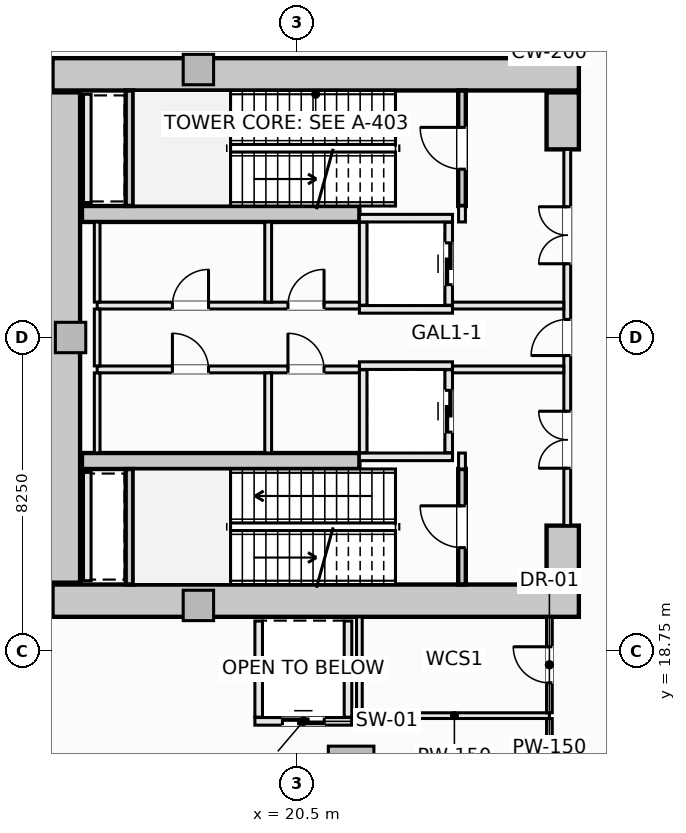
"""IFC4 building model, lengths in metres.
Left out: names, types, materials, properties, quantities, classifications, styles, units other than length and angle.
Written with IfcOpenShell. Run it as: python <this file> out.ifc"""

import sys

from ifc_helpers import new_model, si_unit, direction, frame, frame_2d, origin, origin_2d, place, context, subcontext, project, spatial, rectangle, extrude, element, fill, save


model = new_model("IFC4")
c1 = context("Model", 3, precision=1e-05, world=origin(), true_north=direction((0.0, 1.0)))
c2 = subcontext(c1, "Body", "Model", "MODEL_VIEW")
j1 = project(units=[si_unit("LENGTHUNIT", "METRE"), si_unit("PLANEANGLEUNIT", "RADIAN")], contexts=[c1])
p1 = place(None, origin())
s1 = spatial("IfcSite", under=j1, at=p1, CompositionType="ELEMENT")
p2 = place(p1, origin())
s2 = spatial("IfcBuilding", under=s1, at=p2, CompositionType="ELEMENT")
p3 = place(p2, frame((0.0, 0.0, 10.0)))
s3 = spatial("IfcBuildingStorey", under=s2, at=p3, CompositionType="ELEMENT", Elevation=10.0)
for number, where, z_axis, x_axis in (
    (1, (14.075, 33.925, -0.26), (0.0, 0.0, 1.0), (1.0, 0.0, 0.0)),
    (2, (14.075, 20.075, -0.26), (0.0, 0.0, 1.0), (1.0, 0.0, 0.0)),
):
    element("IfcWall", number, at=place(p3, frame(where, z_axis=z_axis, x_axis=x_axis)), inside=s3, PredefinedType="SHEAR", context=c2, shape_type="SweptSolid", body=[
        extrude(rectangle(XDim=13.85, YDim=0.85, at=frame_2d((6.925, 0.0))), origin(), (0.0, 0.0, 1.0), 5.02),
    ])
p4 = place(p3, frame((14.375, 20.55, -0.26), z_axis=(0.0, 0.0, 1.0), x_axis=(0.0, 1.0, 0.0)))
e3 = element("IfcWall", 3, at=p4, inside=s3, PredefinedType="SHEAR", context=c2, shape_type="SweptSolid", body=[
    extrude(rectangle(XDim=12.9, YDim=0.85, at=frame_2d((6.45, 0.0))), origin(), (0.0, 0.0, 1.0), 5.02),
])
for number, where, z_axis, x_axis in (
    (4, (27.5, 31.95, -0.26), (0.0, 0.0, 1.0), (0.0, 1.0, 0.0)),
    (5, (27.5, 20.55, -0.26), (0.0, 0.0, 1.0), (0.0, 1.0, 0.0)),
):
    element("IfcWall", number, at=place(p3, frame(where, z_axis=z_axis, x_axis=x_axis)), inside=s3, PredefinedType="SHEAR", context=c2, shape_type="SweptSolid", body=[
        extrude(rectangle(XDim=1.5, YDim=0.85, at=frame_2d((0.75, 0.0))), origin(), (0.0, 0.0, 1.0), 5.02),
    ])
for number, where, z_axis, x_axis in (
    (6, (14.85, 30.25, -0.26), (0.0, 0.0, 1.0), (1.0, 0.0, 0.0)),
    (7, (14.85, 23.75, -0.26), (0.0, 0.0, 1.0), (1.0, 0.0, 0.0)),
):
    element("IfcWall", number, at=place(p3, frame(where, z_axis=z_axis, x_axis=x_axis)), inside=s3, PredefinedType="SHEAR", context=c2, shape_type="SweptSolid", body=[
        extrude(rectangle(XDim=7.3, YDim=0.42, at=frame_2d((3.65, 0.0))), origin(), (0.0, 0.0, 1.0), 5.02),
    ])
p5 = place(p3, frame((21.932, 15.648, -0.26), z_axis=(0.0, 0.0, 1.0), x_axis=(1.0, 0.0, 0.0)))
e8 = element("IfcColumn", 8, at=p5, inside=s3, PredefinedType="COLUMN", context=c2, shape_type="SweptSolid", body=[
    extrude(rectangle(XDim=1.2, YDim=1.2, at=origin_2d()), origin(), (0.0, 0.0, 1.0), 5.02),
])
for number, where, z_axis, x_axis in (
    (9, (17.914, 34.05, -0.26), (0.0, 0.0, 1.0), (1.0, 0.0, 0.0)),
    (10, (14.55, 27.0, -0.26), (0.0, 0.0, 1.0), (1.0, 0.0, 0.0)),
    (11, (17.914, 19.95, -0.26), (0.0, 0.0, 1.0), (1.0, 0.0, 0.0)),
):
    element("IfcColumn", number, at=place(p3, frame(where, z_axis=z_axis, x_axis=x_axis)), inside=s3, PredefinedType="PILASTER", context=c2, shape_type="SweptSolid", body=[
        extrude(rectangle(XDim=0.8, YDim=0.8, at=origin_2d()), origin(), (0.0, 0.0, 1.0), 5.02),
    ])
p6 = place(p3, frame((24.85, 30.46, -0.26), z_axis=(0.0, 0.0, 1.0), x_axis=(0.0, 1.0, 0.0)))
e12 = element("IfcWall", 12, at=p6, inside=s3, PredefinedType="SHEAR", context=c2, shape_type="SweptSolid", body=[
    extrude(rectangle(XDim=3.038, YDim=0.2, at=frame_2d((1.519, 0.0))), origin(), (0.0, 0.0, 1.0), 5.02),
])
p7 = place(p6, frame((0.969, 0.0, 0.26)))
e13 = element("IfcOpeningElement", 13, at=p7, cuts=e12, PredefinedType="OPENING", context=c2, shape_type="SweptSolid", body=[
    extrude(rectangle(XDim=1.1, YDim=2.15, at=frame_2d((0.55, 1.075))), frame((0.0, 0.11, 0.0), z_axis=(0.0, -1.0, 0.0), x_axis=(1.0, 0.0, 0.0)), (0.0, 0.0, 1.0), 0.22),
])
p8 = place(p3, frame((16.1, 30.462, -0.26), z_axis=(0.0, 0.0, 1.0), x_axis=(0.0, 1.0, 0.0)))
e14 = element("IfcWall", 14, at=p8, inside=s3, PredefinedType="SHEAR", context=c2, shape_type="SweptSolid", body=[
    extrude(rectangle(XDim=3.036, YDim=0.2, at=frame_2d((1.518, 0.0))), origin(), (0.0, 0.0, 1.0), 5.02),
])
p9 = place(p3, frame((24.85, 20.502, -0.26), z_axis=(0.0, 0.0, 1.0), x_axis=(0.0, 1.0, 0.0)))
e15 = element("IfcWall", 15, at=p9, inside=s3, PredefinedType="SHEAR", context=c2, shape_type="SweptSolid", body=[
    extrude(rectangle(XDim=3.038, YDim=0.2, at=frame_2d((1.519, 0.0))), origin(), (0.0, 0.0, 1.0), 5.02),
])
p10 = place(p9, frame((0.969, 0.0, 0.26)))
e16 = element("IfcOpeningElement", 16, at=p10, cuts=e15, PredefinedType="OPENING", context=c2, shape_type="SweptSolid", body=[
    extrude(rectangle(XDim=1.1, YDim=2.15, at=frame_2d((0.55, 1.075))), frame((0.0, 0.11, 0.0), z_axis=(0.0, -1.0, 0.0), x_axis=(1.0, 0.0, 0.0)), (0.0, 0.0, 1.0), 0.22),
])
p11 = place(p3, frame((16.1, 20.502, -0.26), z_axis=(0.0, 0.0, 1.0), x_axis=(0.0, 1.0, 0.0)))
e17 = element("IfcWall", 17, at=p11, inside=s3, PredefinedType="SHEAR", context=c2, shape_type="SweptSolid", body=[
    extrude(rectangle(XDim=3.036, YDim=0.2, at=frame_2d((1.518, 0.0))), origin(), (0.0, 0.0, 1.0), 5.02),
])
for number, where, z_axis, x_axis in (
    (18, (22.15, 30.14, 0.0), (0.0, 0.0, 1.0), (1.0, 0.0, 0.0)),
    (19, (22.15, 27.74, 0.0), (0.0, 0.0, 1.0), (1.0, 0.0, 0.0)),
):
    element("IfcWall", number, at=place(p3, frame(where, z_axis=z_axis, x_axis=x_axis)), inside=s3, PredefinedType="SOLIDWALL", context=c2, shape_type="SweptSolid", body=[
        extrude(rectangle(XDim=2.45, YDim=0.2, at=frame_2d((1.225, 0.0))), origin(), (0.0, 0.0, 1.0), 4.76),
    ])
p12 = place(p3, frame((22.25, 27.85, 0.0), z_axis=(0.0, 0.0, 1.0), x_axis=(0.0, 1.0, 0.0)))
e20 = element("IfcWall", 20, at=p12, inside=s3, PredefinedType="SOLIDWALL", context=c2, shape_type="SweptSolid", body=[
    extrude(rectangle(XDim=2.18, YDim=0.2, at=frame_2d((1.09, 0.0))), origin(), (0.0, 0.0, 1.0), 4.76),
])
p13 = place(p3, frame((24.5, 27.85, 0.0), z_axis=(0.0, 0.0, 1.0), x_axis=(0.0, 1.0, 0.0)))
e21 = element("IfcWall", 21, at=p13, inside=s3, PredefinedType="SOLIDWALL", context=c2, shape_type="SweptSolid", body=[
    extrude(rectangle(XDim=2.18, YDim=0.2, at=frame_2d((1.09, 0.0))), origin(), (0.0, 0.0, 1.0), 4.76),
])
p14 = place(p13, frame((0.54, 0.0, 0.0)))
e22 = element("IfcOpeningElement", 22, at=p14, cuts=e21, PredefinedType="OPENING", context=c2, shape_type="SweptSolid", body=[
    extrude(rectangle(XDim=1.1, YDim=2.2, at=frame_2d((0.55, 1.1))), frame((0.0, 0.11, 0.0), z_axis=(0.0, -1.0, 0.0), x_axis=(1.0, 0.0, 0.0)), (0.0, 0.0, 1.0), 0.22),
])
for number, where, z_axis, x_axis in (
    (23, (22.15, 26.26, 0.0), (0.0, 0.0, 1.0), (1.0, 0.0, 0.0)),
    (24, (22.15, 23.86, 0.0), (0.0, 0.0, 1.0), (1.0, 0.0, 0.0)),
):
    element("IfcWall", number, at=place(p3, frame(where, z_axis=z_axis, x_axis=x_axis)), inside=s3, PredefinedType="SOLIDWALL", context=c2, shape_type="SweptSolid", body=[
        extrude(rectangle(XDim=2.45, YDim=0.2, at=frame_2d((1.225, 0.0))), origin(), (0.0, 0.0, 1.0), 4.76),
    ])
p15 = place(p3, frame((22.25, 23.97, 0.0), z_axis=(0.0, 0.0, 1.0), x_axis=(0.0, 1.0, 0.0)))
e25 = element("IfcWall", 25, at=p15, inside=s3, PredefinedType="SOLIDWALL", context=c2, shape_type="SweptSolid", body=[
    extrude(rectangle(XDim=2.18, YDim=0.2, at=frame_2d((1.09, 0.0))), origin(), (0.0, 0.0, 1.0), 4.76),
])
p16 = place(p3, frame((24.5, 23.97, 0.0), z_axis=(0.0, 0.0, 1.0), x_axis=(0.0, 1.0, 0.0)))
e26 = element("IfcWall", 26, at=p16, inside=s3, PredefinedType="SOLIDWALL", context=c2, shape_type="SweptSolid", body=[
    extrude(rectangle(XDim=2.18, YDim=0.2, at=frame_2d((1.09, 0.0))), origin(), (0.0, 0.0, 1.0), 4.76),
])
p17 = place(p16, frame((0.54, 0.0, 0.0)))
e27 = element("IfcOpeningElement", 27, at=p17, cuts=e26, PredefinedType="OPENING", context=c2, shape_type="SweptSolid", body=[
    extrude(rectangle(XDim=1.1, YDim=2.2, at=frame_2d((0.55, 1.1))), frame((0.0, 0.11, 0.0), z_axis=(0.0, -1.0, 0.0), x_axis=(1.0, 0.0, 0.0)), (0.0, 0.0, 1.0), 0.22),
])
p18 = place(p3, frame((19.4, 16.9, 0.0), z_axis=(0.0, 0.0, 1.0), x_axis=(1.0, 0.0, 0.0)))
e28 = element("IfcWall", 28, at=p18, inside=s3, PredefinedType="SOLIDWALL", context=c2, shape_type="SweptSolid", body=[
    extrude(rectangle(XDim=2.55, YDim=0.2, at=frame_2d((1.275, 0.0))), origin(), (0.0, 0.0, 1.0), 4.76),
])
p19 = place(p18, frame((0.725, 0.0, 0.0)))
e29 = element("IfcOpeningElement", 29, at=p19, cuts=e28, PredefinedType="OPENING", context=c2, shape_type="SweptSolid", body=[
    extrude(rectangle(XDim=1.1, YDim=2.2, at=frame_2d((0.55, 1.1))), frame((0.0, 0.11, 0.0), z_axis=(0.0, -1.0, 0.0), x_axis=(1.0, 0.0, 0.0)), (0.0, 0.0, 1.0), 0.22),
])
for number, where, z_axis, x_axis in (
    (30, (19.5, 17.01, 0.0), (0.0, 0.0, 1.0), (0.0, 1.0, 0.0)),
    (31, (21.85, 17.01, 0.0), (0.0, 0.0, 1.0), (0.0, 1.0, 0.0)),
):
    element("IfcWall", number, at=place(p3, frame(where, z_axis=z_axis, x_axis=x_axis)), inside=s3, PredefinedType="SOLIDWALL", context=c2, shape_type="SweptSolid", body=[
        extrude(rectangle(XDim=2.53, YDim=0.2, at=frame_2d((1.265, 0.0))), origin(), (0.0, 0.0, 1.0), 4.76),
    ])
for number, where, z_axis, x_axis in (
    (32, (14.99, 30.55, 0.0), (0.0, 0.0, 1.0), (0.0, 1.0, 0.0)),
    (33, (14.99, 20.6, 0.0), (0.0, 0.0, 1.0), (0.0, 1.0, 0.0)),
):
    element("IfcWall", number, at=place(p3, frame(where, z_axis=z_axis, x_axis=x_axis)), inside=s3, PredefinedType="SOLIDWALL", context=c2, shape_type="SweptSolid", body=[
        extrude(rectangle(XDim=2.85, YDim=0.2, at=frame_2d((1.425, 0.0))), origin(), (0.0, 0.0, 1.0), 4.76),
    ])
for number, where, z_axis, x_axis in (
    (34, (24.85, 23.54, 0.0), (0.0, 0.0, 1.0), (0.0, 1.0, 0.0)),
    (35, (24.85, 30.04, 0.0), (0.0, 0.0, 1.0), (0.0, 1.0, 0.0)),
):
    element("IfcWall", number, at=place(p3, frame(where, z_axis=z_axis, x_axis=x_axis)), inside=s3, PredefinedType="SOLIDWALL", context=c2, shape_type="SweptSolid", body=[
        extrude(rectangle(XDim=0.42, YDim=0.18, at=frame_2d((0.21, 0.0))), origin(), (0.0, 0.0, 1.0), 4.76),
    ])
p20 = place(p3, frame((27.62, 22.05, 0.0), z_axis=(0.0, 0.0, 1.0), x_axis=(0.0, 1.0, 0.0)))
e36 = element("IfcWall", 36, at=p20, inside=s3, PredefinedType="SOLIDWALL", context=c2, shape_type="SweptSolid", body=[
    extrude(rectangle(XDim=9.9, YDim=0.18, at=frame_2d((4.95, 0.0))), origin(), (0.0, 0.0, 1.0), 3.852),
])
p21 = place(p20, frame((4.475, 0.0, 0.0)))
e37 = element("IfcOpeningElement", 37, at=p21, cuts=e36, PredefinedType="OPENING", context=c2, shape_type="SweptSolid", body=[
    extrude(rectangle(XDim=0.95, YDim=2.1, at=frame_2d((0.475, 1.05))), frame((0.0, 0.1, 0.0), z_axis=(0.0, -1.0, 0.0), x_axis=(1.0, 0.0, 0.0)), (0.0, 0.0, 1.0), 0.2),
])
p22 = place(p20, frame((6.89, 0.0, 0.0)))
e38 = element("IfcOpeningElement", 38, at=p22, cuts=e36, PredefinedType="OPENING", context=c2, shape_type="SweptSolid", body=[
    extrude(rectangle(XDim=1.5, YDim=2.2, at=frame_2d((0.75, 1.1))), frame((0.0, 0.1, 0.0), z_axis=(0.0, -1.0, 0.0), x_axis=(1.0, 0.0, 0.0)), (0.0, 0.0, 1.0), 0.2),
])
p23 = place(p20, frame((1.51, 0.0, 0.0)))
e39 = element("IfcOpeningElement", 39, at=p23, cuts=e36, PredefinedType="OPENING", context=c2, shape_type="SweptSolid", body=[
    extrude(rectangle(XDim=1.5, YDim=2.2, at=frame_2d((0.75, 1.1))), frame((0.0, 0.1, 0.0), z_axis=(0.0, -1.0, 0.0), x_axis=(1.0, 0.0, 0.0)), (0.0, 0.0, 1.0), 0.2),
])
p24 = place(p3, frame((15.25, 27.84, 0.0), z_axis=(0.0, 0.0, 1.0), x_axis=(1.0, 0.0, 0.0)))
e40 = element("IfcWall", 40, at=p24, inside=s3, PredefinedType="SOLIDWALL", context=c2, shape_type="SweptSolid", body=[
    extrude(rectangle(XDim=6.9, YDim=0.18, at=frame_2d((3.45, 0.0))), origin(), (0.0, 0.0, 1.0), 4.76),
])
p25 = place(p24, frame((5.02, 0.0, 0.0)))
e41 = element("IfcOpeningElement", 41, at=p25, cuts=e40, PredefinedType="OPENING", context=c2, shape_type="SweptSolid", body=[
    extrude(rectangle(XDim=0.95, YDim=2.1, at=frame_2d((0.475, 1.05))), frame((0.0, 0.1, 0.0), z_axis=(0.0, -1.0, 0.0), x_axis=(1.0, 0.0, 0.0)), (0.0, 0.0, 1.0), 0.2),
])
p26 = place(p24, frame((1.98, 0.0, 0.0)))
e42 = element("IfcOpeningElement", 42, at=p26, cuts=e40, PredefinedType="OPENING", context=c2, shape_type="SweptSolid", body=[
    extrude(rectangle(XDim=0.95, YDim=2.1, at=frame_2d((0.475, 1.05))), frame((0.0, 0.1, 0.0), z_axis=(0.0, -1.0, 0.0), x_axis=(1.0, 0.0, 0.0)), (0.0, 0.0, 1.0), 0.2),
])
p27 = place(p3, frame((24.6, 27.84, 0.0), z_axis=(0.0, 0.0, 1.0), x_axis=(1.0, 0.0, 0.0)))
e43 = element("IfcWall", 43, at=p27, inside=s3, PredefinedType="SOLIDWALL", context=c2, shape_type="SweptSolid", body=[
    extrude(rectangle(XDim=2.928, YDim=0.18, at=frame_2d((1.464, 0.0))), origin(), (0.0, 0.0, 1.0), 4.76),
])
p28 = place(p3, frame((15.25, 26.16, 0.0), z_axis=(0.0, 0.0, 1.0), x_axis=(1.0, 0.0, 0.0)))
e44 = element("IfcWall", 44, at=p28, inside=s3, PredefinedType="SOLIDWALL", context=c2, shape_type="SweptSolid", body=[
    extrude(rectangle(XDim=6.9, YDim=0.18, at=frame_2d((3.45, 0.0))), origin(), (0.0, 0.0, 1.0), 4.76),
])
p29 = place(p28, frame((5.02, 0.0, 0.0)))
e45 = element("IfcOpeningElement", 45, at=p29, cuts=e44, PredefinedType="OPENING", context=c2, shape_type="SweptSolid", body=[
    extrude(rectangle(XDim=0.95, YDim=2.1, at=frame_2d((0.475, 1.05))), frame((0.0, 0.1, 0.0), z_axis=(0.0, -1.0, 0.0), x_axis=(1.0, 0.0, 0.0)), (0.0, 0.0, 1.0), 0.2),
])
p30 = place(p28, frame((1.98, 0.0, 0.0)))
e46 = element("IfcOpeningElement", 46, at=p30, cuts=e44, PredefinedType="OPENING", context=c2, shape_type="SweptSolid", body=[
    extrude(rectangle(XDim=0.95, YDim=2.1, at=frame_2d((0.475, 1.05))), frame((0.0, 0.1, 0.0), z_axis=(0.0, -1.0, 0.0), x_axis=(1.0, 0.0, 0.0)), (0.0, 0.0, 1.0), 0.2),
])
p31 = place(p3, frame((24.6, 26.16, 0.0), z_axis=(0.0, 0.0, 1.0), x_axis=(1.0, 0.0, 0.0)))
e47 = element("IfcWall", 47, at=p31, inside=s3, PredefinedType="SOLIDWALL", context=c2, shape_type="SweptSolid", body=[
    extrude(rectangle(XDim=2.928, YDim=0.18, at=frame_2d((1.464, 0.0))), origin(), (0.0, 0.0, 1.0), 4.76),
])
p32 = place(p3, frame((15.25, 23.962, 0.0), z_axis=(0.0, 0.0, 1.0), x_axis=(0.0, 1.0, 0.0)))
e48 = element("IfcWall", 48, at=p32, inside=s3, PredefinedType="PARTITIONING", context=c2, shape_type="SweptSolid", body=[
    extrude(rectangle(XDim=2.106, YDim=0.15, at=frame_2d((1.053, 0.0))), origin(), (0.0, 0.0, 1.0), 4.76),
])
p33 = place(p3, frame((15.25, 26.252, 0.0), z_axis=(0.0, 0.0, 1.0), x_axis=(0.0, 1.0, 0.0)))
e49 = element("IfcWall", 49, at=p33, inside=s3, PredefinedType="PARTITIONING", context=c2, shape_type="SweptSolid", body=[
    extrude(rectangle(XDim=1.496, YDim=0.15, at=frame_2d((0.748, 0.0))), origin(), (0.0, 0.0, 1.0), 4.76),
])
p34 = place(p3, frame((15.25, 27.932, 0.0), z_axis=(0.0, 0.0, 1.0), x_axis=(0.0, 1.0, 0.0)))
e50 = element("IfcWall", 50, at=p34, inside=s3, PredefinedType="PARTITIONING", context=c2, shape_type="SweptSolid", body=[
    extrude(rectangle(XDim=2.106, YDim=0.15, at=frame_2d((1.053, 0.0))), origin(), (0.0, 0.0, 1.0), 4.76),
])
for number, where, z_axis, x_axis in (
    (51, (19.75, 23.962, 0.0), (0.0, 0.0, 1.0), (0.0, 1.0, 0.0)),
    (52, (19.75, 27.932, 0.0), (0.0, 0.0, 1.0), (0.0, 1.0, 0.0)),
):
    element("IfcWall", number, at=place(p3, frame(where, z_axis=z_axis, x_axis=x_axis)), inside=s3, PredefinedType="SOLIDWALL", context=c2, shape_type="SweptSolid", body=[
        extrude(rectangle(XDim=2.106, YDim=0.18, at=frame_2d((1.053, 0.0))), origin(), (0.0, 0.0, 1.0), 4.76),
    ])
p35 = place(p3, frame((22.15, 17.05, 0.0), z_axis=(0.0, 0.0, 1.0), x_axis=(1.0, 0.0, 0.0)))
e53 = element("IfcWall", 53, at=p35, inside=s3, PredefinedType="PARTITIONING", context=c2, shape_type="SweptSolid", body=[
    extrude(rectangle(XDim=5.0, YDim=0.15, at=frame_2d((2.5, 0.0))), origin(), (0.0, 0.0, 1.0), 4.76),
])
p36 = place(p3, frame((22.15, 17.127, 0.0), z_axis=(0.0, 0.0, 1.0), x_axis=(0.0, 1.0, 0.0)))
e54 = element("IfcWall", 54, at=p36, inside=s3, PredefinedType="PARTITIONING", context=c2, shape_type="SweptSolid", body=[
    extrude(rectangle(XDim=2.521, YDim=0.15, at=frame_2d((1.26, 0.0))), origin(), (0.0, 0.0, 1.0), 4.76),
])
p37 = place(p3, frame((27.15, 11.75, 0.0), z_axis=(0.0, 0.0, 1.0), x_axis=(0.0, 1.0, 0.0)))
e55 = element("IfcWall", 55, at=p37, inside=s3, PredefinedType="PARTITIONING", context=c2, shape_type="SweptSolid", body=[
    extrude(rectangle(XDim=5.223, YDim=0.15, at=frame_2d((2.611, 0.0))), origin(), (0.0, 0.0, 1.0), 4.76),
])
p38 = place(p3, frame((27.15, 17.127, 0.0), z_axis=(0.0, 0.0, 1.0), x_axis=(0.0, 1.0, 0.0)))
e56 = element("IfcWall", 56, at=p38, inside=s3, PredefinedType="PARTITIONING", context=c2, shape_type="SweptSolid", body=[
    extrude(rectangle(XDim=2.521, YDim=0.15, at=frame_2d((1.26, 0.0))), origin(), (0.0, 0.0, 1.0), 4.76),
])
p39 = place(p38, frame((0.785, 0.0, 0.0)))
e57 = element("IfcOpeningElement", 57, at=p39, cuts=e56, PredefinedType="OPENING", context=c2, shape_type="SweptSolid", body=[
    extrude(rectangle(XDim=0.95, YDim=2.1, at=frame_2d((0.475, 1.05))), frame((0.0, 0.085, 0.0), z_axis=(0.0, -1.0, 0.0), x_axis=(1.0, 0.0, 0.0)), (0.0, 0.0, 1.0), 0.17),
])
p40 = place(p3, frame((27.25, 34.352, 0.0), z_axis=(0.0, 0.0, 1.0), x_axis=(0.0, 1.0, 0.0)))
e58 = element("IfcWall", 58, at=p40, inside=s3, PredefinedType="PARTITIONING", context=c2, shape_type="SweptSolid", body=[
    extrude(rectangle(XDim=0.606, YDim=0.12, at=frame_2d((0.303, 0.0))), origin(), (0.0, 0.0, 1.0), 4.76),
])
p41 = place(p3, frame((26.823, 34.958, 0.0), z_axis=(0.0, 0.0, 1.0), x_axis=(0.642124432794, -0.766600425782, 0.0)))
e59 = element("IfcWall", 59, at=p41, inside=s3, PredefinedType="PARTITIONING", context=c2, shape_type="SweptSolid", body=[
    extrude(rectangle(XDim=0.569, YDim=0.12, at=frame_2d((0.284, 0.0))), origin(), (0.0, 0.0, 1.0), 4.76),
])
p42 = place(p7, origin())
e60 = element("IfcDoor", 60, at=p42, inside=s3, OperationType="SINGLE_SWING_RIGHT", PredefinedType="DOOR", context=c2, shape_type="SweptSolid", body=[
    extrude(rectangle(XDim=1.1, YDim=2.15, at=frame_2d((0.55, 1.075))), frame((0.0, 0.025, 0.0), z_axis=(0.0, -1.0, 0.0), x_axis=(1.0, 0.0, 0.0)), (0.0, 0.0, 1.0), 0.05),
])
fill(e13, e60)
p43 = place(p10, origin())
e61 = element("IfcDoor", 61, at=p43, inside=s3, OperationType="SINGLE_SWING_RIGHT", PredefinedType="DOOR", context=c2, shape_type="SweptSolid", body=[
    extrude(rectangle(XDim=1.1, YDim=2.15, at=frame_2d((0.55, 1.075))), frame((0.0, 0.025, 0.0), z_axis=(0.0, -1.0, 0.0), x_axis=(1.0, 0.0, 0.0)), (0.0, 0.0, 1.0), 0.05),
])
fill(e16, e61)
p44 = place(p14, origin())
e62 = element("IfcDoor", 62, at=p44, inside=s3, OperationType="SLIDING_TO_LEFT", PredefinedType="DOOR", context=c2, shape_type="SweptSolid", body=[
    extrude(rectangle(XDim=1.1, YDim=2.2, at=frame_2d((0.55, 1.1))), frame((0.0, 0.025, 0.0), z_axis=(0.0, -1.0, 0.0), x_axis=(1.0, 0.0, 0.0)), (0.0, 0.0, 1.0), 0.05),
])
fill(e22, e62)
p45 = place(p17, origin())
e63 = element("IfcDoor", 63, at=p45, inside=s3, OperationType="SLIDING_TO_LEFT", PredefinedType="DOOR", context=c2, shape_type="SweptSolid", body=[
    extrude(rectangle(XDim=1.1, YDim=2.2, at=frame_2d((0.55, 1.1))), frame((0.0, 0.025, 0.0), z_axis=(0.0, -1.0, 0.0), x_axis=(1.0, 0.0, 0.0)), (0.0, 0.0, 1.0), 0.05),
])
fill(e27, e63)
p46 = place(p19, origin())
e64 = element("IfcDoor", 64, at=p46, inside=s3, OperationType="SLIDING_TO_LEFT", PredefinedType="DOOR", context=c2, shape_type="SweptSolid", body=[
    extrude(rectangle(XDim=1.1, YDim=2.2, at=frame_2d((0.55, 1.1))), frame((0.0, 0.025, 0.0), z_axis=(0.0, -1.0, 0.0), x_axis=(1.0, 0.0, 0.0)), (0.0, 0.0, 1.0), 0.05),
])
fill(e29, e64)
p47 = place(p21, origin())
e65 = element("IfcDoor", 65, at=p47, inside=s3, OperationType="SINGLE_SWING_LEFT", PredefinedType="DOOR", context=c2, shape_type="SweptSolid", body=[
    extrude(rectangle(XDim=0.95, YDim=2.1, at=frame_2d((0.475, 1.05))), frame((0.0, 0.025, 0.0), z_axis=(0.0, -1.0, 0.0), x_axis=(1.0, 0.0, 0.0)), (0.0, 0.0, 1.0), 0.05),
])
fill(e37, e65)
p48 = place(p22, origin())
e66 = element("IfcDoor", 66, at=p48, inside=s3, OperationType="DOUBLE_DOOR_SINGLE_SWING", PredefinedType="DOOR", context=c2, shape_type="SweptSolid", body=[
    extrude(rectangle(XDim=1.5, YDim=2.2, at=frame_2d((0.75, 1.1))), frame((0.0, 0.025, 0.0), z_axis=(0.0, -1.0, 0.0), x_axis=(1.0, 0.0, 0.0)), (0.0, 0.0, 1.0), 0.05),
])
fill(e38, e66)
p49 = place(p23, origin())
e67 = element("IfcDoor", 67, at=p49, inside=s3, OperationType="DOUBLE_DOOR_SINGLE_SWING", PredefinedType="DOOR", context=c2, shape_type="SweptSolid", body=[
    extrude(rectangle(XDim=1.5, YDim=2.2, at=frame_2d((0.75, 1.1))), frame((0.0, 0.025, 0.0), z_axis=(0.0, -1.0, 0.0), x_axis=(1.0, 0.0, 0.0)), (0.0, 0.0, 1.0), 0.05),
])
fill(e39, e67)
p50 = place(p25, origin())
e68 = element("IfcDoor", 68, at=p50, inside=s3, OperationType="SINGLE_SWING_RIGHT", PredefinedType="DOOR", context=c2, shape_type="SweptSolid", body=[
    extrude(rectangle(XDim=0.95, YDim=2.1, at=frame_2d((0.475, 1.05))), frame((0.0, 0.025, 0.0), z_axis=(0.0, -1.0, 0.0), x_axis=(1.0, 0.0, 0.0)), (0.0, 0.0, 1.0), 0.05),
])
fill(e41, e68)
p51 = place(p29, origin())
e69 = element("IfcDoor", 69, at=p51, inside=s3, OperationType="SINGLE_SWING_LEFT", PredefinedType="DOOR", context=c2, shape_type="SweptSolid", body=[
    extrude(rectangle(XDim=0.95, YDim=2.1, at=frame_2d((0.475, 1.05))), frame((0.0, 0.025, 0.0), z_axis=(0.0, -1.0, 0.0), x_axis=(1.0, 0.0, 0.0)), (0.0, 0.0, 1.0), 0.05),
])
fill(e45, e69)
p52 = place(p26, origin())
e70 = element("IfcDoor", 70, at=p52, inside=s3, OperationType="SINGLE_SWING_RIGHT", PredefinedType="DOOR", context=c2, shape_type="SweptSolid", body=[
    extrude(rectangle(XDim=0.95, YDim=2.1, at=frame_2d((0.475, 1.05))), frame((0.0, 0.025, 0.0), z_axis=(0.0, -1.0, 0.0), x_axis=(1.0, 0.0, 0.0)), (0.0, 0.0, 1.0), 0.05),
])
fill(e42, e70)
p53 = place(p30, origin())
e71 = element("IfcDoor", 71, at=p53, inside=s3, OperationType="SINGLE_SWING_LEFT", PredefinedType="DOOR", context=c2, shape_type="SweptSolid", body=[
    extrude(rectangle(XDim=0.95, YDim=2.1, at=frame_2d((0.475, 1.05))), frame((0.0, 0.025, 0.0), z_axis=(0.0, -1.0, 0.0), x_axis=(1.0, 0.0, 0.0)), (0.0, 0.0, 1.0), 0.05),
])
fill(e46, e71)
p54 = place(p39, origin())
e72 = element("IfcDoor", 72, at=p54, inside=s3, OperationType="SINGLE_SWING_RIGHT", PredefinedType="DOOR", context=c2, shape_type="SweptSolid", body=[
    extrude(rectangle(XDim=0.95, YDim=2.1, at=frame_2d((0.475, 1.05))), frame((0.0, 0.025, 0.0), z_axis=(0.0, -1.0, 0.0), x_axis=(1.0, 0.0, 0.0)), (0.0, 0.0, 1.0), 0.05),
])
fill(e57, e72)
save(model, sys.argv[1])
